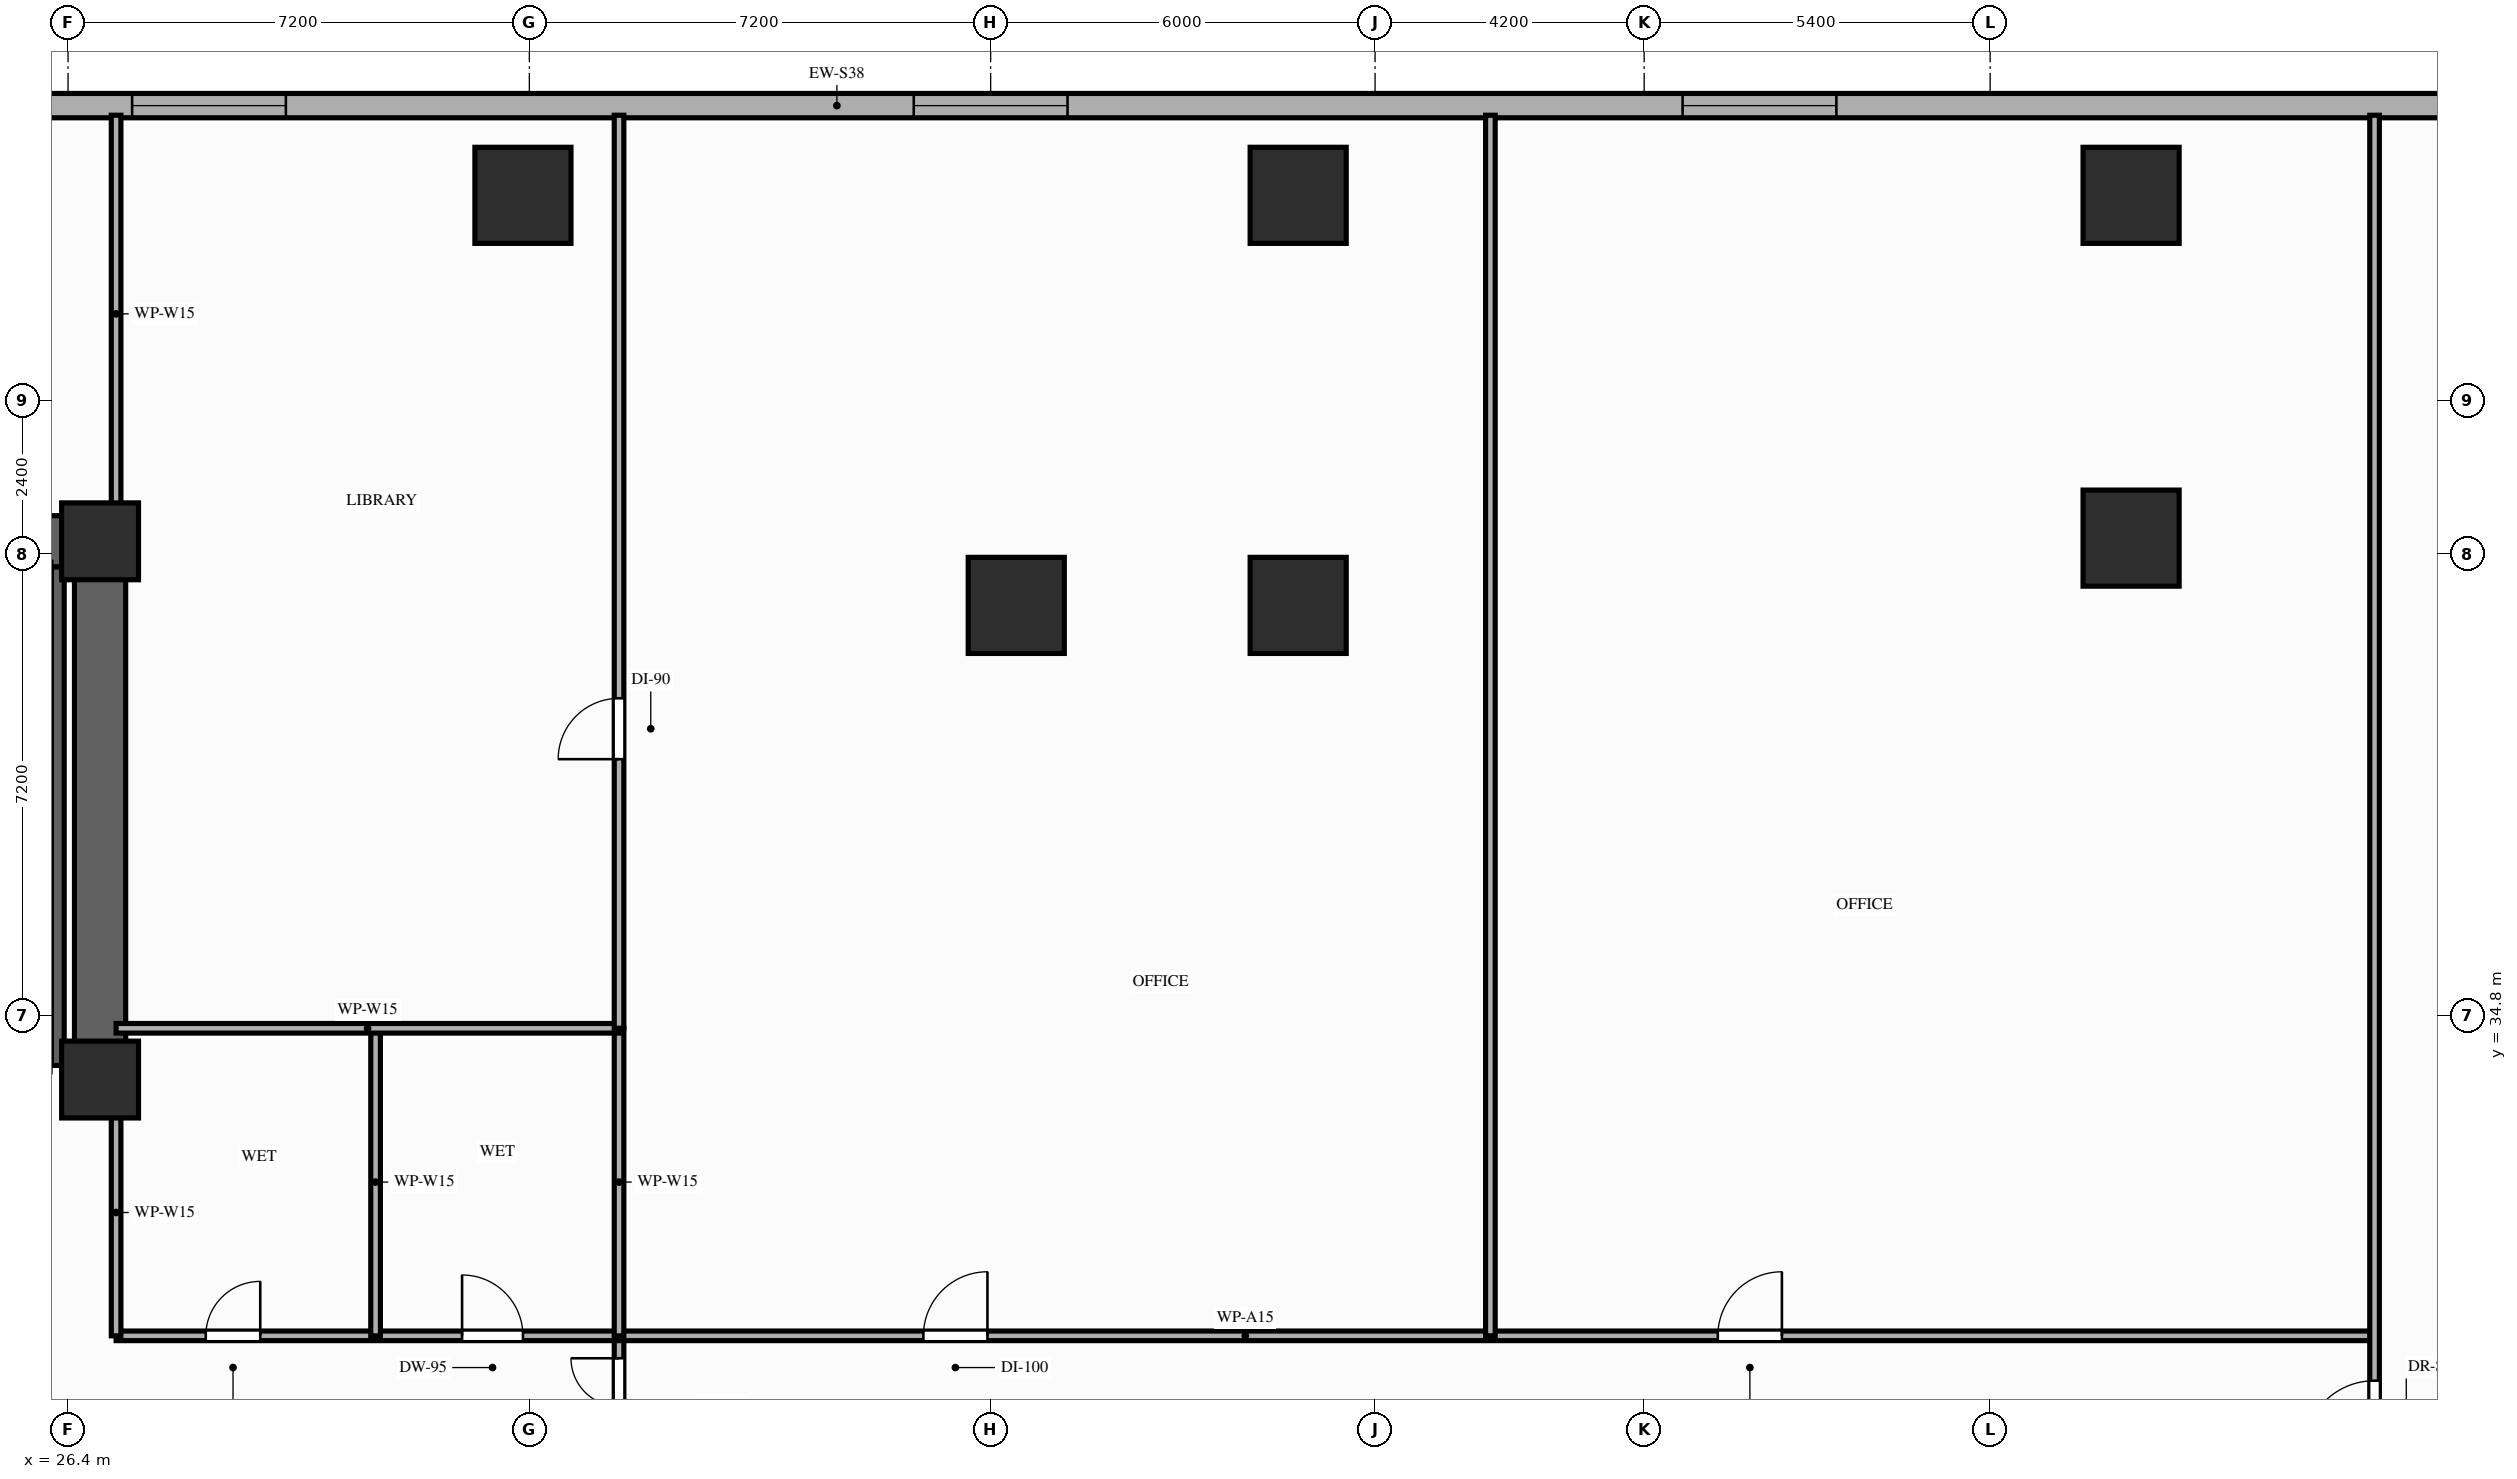
"""IFC4 building model, lengths in metres.
Left out: names, types, materials, properties, quantities, classifications, styles, units other than length and angle.
Written with IfcOpenShell. Run it as: python <this file> out.ifc"""

import sys

from ifc_helpers import new_model, si_unit, direction, frame, frame_2d, origin, origin_2d, place, context, subcontext, project, spatial, rectangle, extrude, element, fill, save


model = new_model("IFC4")
c1 = context("Model", 3, precision=1e-05, world=origin(), true_north=direction((0.0, 1.0)))
c2 = subcontext(c1, "Body", "Model", "MODEL_VIEW")
j1 = project(units=[si_unit("LENGTHUNIT", "METRE"), si_unit("PLANEANGLEUNIT", "RADIAN")], contexts=[c1])
p1 = place(None, origin())
s1 = spatial("IfcSite", under=j1, at=p1, CompositionType="ELEMENT")
p2 = place(p1, origin())
s2 = spatial("IfcBuilding", under=s1, at=p2, CompositionType="ELEMENT")
p3 = place(p2, frame((0.0, 0.0, 8.8)))
s3 = spatial("IfcBuildingStorey", under=s2, at=p3, CompositionType="ELEMENT", Elevation=8.8)
for number, where, z_axis, x_axis in (
    (1, (26.9, 33.8, 0.0), (0.0, 0.0, 1.0), (1.0, 0.0, 0.0)),
    (2, (26.9, 42.2, 0.0), (0.0, 0.0, 1.0), (1.0, 0.0, 0.0)),
):
    element("IfcColumn", number, at=place(p3, frame(where, z_axis=z_axis, x_axis=x_axis)), inside=s3, PredefinedType="COLUMN", context=c2, shape_type="SweptSolid", body=[
        extrude(rectangle(XDim=1.2, YDim=1.2, at=origin_2d()), origin(), (0.0, 0.0, 1.0), 4.2),
    ])
for number, where, z_axis, x_axis in (
    (3, (41.2, 41.2, 0.0), (0.0, 0.0, 1.0), (1.0, 0.0, 0.0)),
    (4, (45.6, 41.2, 0.0), (0.0, 0.0, 1.0), (1.0, 0.0, 0.0)),
    (5, (58.6, 42.25, 0.0), (0.0, 0.0, 1.0), (1.0, 0.0, 0.0)),
    (6, (33.5, 47.6, 0.0), (0.0, 0.0, 1.0), (1.0, 0.0, 0.0)),
    (7, (45.6, 47.6, 0.0), (0.0, 0.0, 1.0), (1.0, 0.0, 0.0)),
    (8, (58.6, 47.6, 0.0), (0.0, 0.0, 1.0), (1.0, 0.0, 0.0)),
):
    element("IfcColumn", number, at=place(p3, frame(where, z_axis=z_axis, x_axis=x_axis)), inside=s3, PredefinedType="COLUMN", context=c2, shape_type="SweptSolid", body=[
        extrude(rectangle(XDim=1.5, YDim=1.5, at=origin_2d()), origin(), (0.0, 0.0, 1.0), 4.2),
    ])
p4 = place(p3, frame((73.2, 49.0, 0.0), z_axis=(0.0, 0.0, 1.0), x_axis=(-1.0, 0.0, 0.0)))
e9 = element("IfcWall", 9, at=p4, inside=s3, PredefinedType="STANDARD", context=c2, shape_type="SweptSolid", body=[
    extrude(rectangle(XDim=69.6, YDim=0.38, at=frame_2d((34.8, 0.0))), origin(), (0.0, 0.0, 1.0), 3.95),
])
p5 = place(p4, frame((3.4, 0.0, 0.9)))
e10 = element("IfcOpeningElement", 10, at=p5, cuts=e9, PredefinedType="OPENING", context=c2, shape_type="SweptSolid", body=[
    extrude(rectangle(XDim=2.4, YDim=2.15, at=frame_2d((1.2, 1.075))), frame((0.0, 0.2, 0.0), z_axis=(0.0, -1.0, 0.0), x_axis=(1.0, 0.0, 0.0)), (0.0, 0.0, 1.0), 0.4),
])
p6 = place(p4, frame((19.2, 0.0, 0.9)))
e11 = element("IfcOpeningElement", 11, at=p6, cuts=e9, PredefinedType="OPENING", context=c2, shape_type="SweptSolid", body=[
    extrude(rectangle(XDim=2.4, YDim=2.15, at=frame_2d((1.2, 1.075))), frame((0.0, 0.2, 0.0), z_axis=(0.0, -1.0, 0.0), x_axis=(1.0, 0.0, 0.0)), (0.0, 0.0, 1.0), 0.4),
])
p7 = place(p4, frame((31.2, 0.0, 0.9)))
e12 = element("IfcOpeningElement", 12, at=p7, cuts=e9, PredefinedType="OPENING", context=c2, shape_type="SweptSolid", body=[
    extrude(rectangle(XDim=2.4, YDim=2.15, at=frame_2d((1.2, 1.075))), frame((0.0, 0.2, 0.0), z_axis=(0.0, -1.0, 0.0), x_axis=(1.0, 0.0, 0.0)), (0.0, 0.0, 1.0), 0.4),
])
p8 = place(p4, frame((43.4, 0.0, 0.9)))
e13 = element("IfcOpeningElement", 13, at=p8, cuts=e9, PredefinedType="OPENING", context=c2, shape_type="SweptSolid", body=[
    extrude(rectangle(XDim=2.4, YDim=2.15, at=frame_2d((1.2, 1.075))), frame((0.0, 0.2, 0.0), z_axis=(0.0, -1.0, 0.0), x_axis=(1.0, 0.0, 0.0)), (0.0, 0.0, 1.0), 0.4),
])
p9 = place(p4, frame((55.6, 0.0, 0.9)))
e14 = element("IfcOpeningElement", 14, at=p9, cuts=e9, PredefinedType="OPENING", context=c2, shape_type="SweptSolid", body=[
    extrude(rectangle(XDim=2.4, YDim=2.15, at=frame_2d((1.2, 1.075))), frame((0.0, 0.2, 0.0), z_axis=(0.0, -1.0, 0.0), x_axis=(1.0, 0.0, 0.0)), (0.0, 0.0, 1.0), 0.4),
])
p10 = place(p3, frame((6.45, 42.2, 0.0), z_axis=(0.0, 0.0, 1.0), x_axis=(1.0, 0.0, 0.0)))
e15 = element("IfcWall", 15, at=p10, inside=s3, PredefinedType="SHEAR", context=c2, shape_type="SweptSolid", body=[
    extrude(rectangle(XDim=20.45, YDim=0.8, at=frame_2d((10.225, 0.0))), origin(), (0.0, 0.0, 1.0), 3.95),
])
p11 = place(p3, frame((26.9, 33.8, 0.0), z_axis=(0.0, 0.0, 1.0), x_axis=(0.0, 1.0, 0.0)))
e16 = element("IfcWall", 16, at=p11, inside=s3, PredefinedType="SHEAR", context=c2, shape_type="SweptSolid", body=[
    extrude(rectangle(XDim=7.95, YDim=0.8, at=frame_2d((3.975, 0.0))), origin(), (0.0, 0.0, 1.0), 3.95),
])
p12 = place(p3, frame((26.24, 34.02, 0.0), z_axis=(0.0, 0.0, 1.0), x_axis=(0.0, 1.0, 0.0)))
e17 = element("IfcWall", 17, at=p12, inside=s3, PredefinedType="SHEAR", context=c2, shape_type="SweptSolid", body=[
    extrude(rectangle(XDim=7.78, YDim=0.2, at=frame_2d((3.89, 0.0))), origin(), (0.0, 0.0, 1.0), 3.95),
])
p13 = place(p3, frame((35.0, 27.6, 0.0), z_axis=(0.0, 0.0, 1.0), x_axis=(0.0, 1.0, 0.0)))
e18 = element("IfcWall", 18, at=p13, inside=s3, PredefinedType="PARTITIONING", context=c2, shape_type="SweptSolid", body=[
    extrude(rectangle(XDim=2.2, YDim=0.15, at=frame_2d((1.1, 0.0))), origin(), (0.0, 0.0, 1.0), 3.13),
])
p14 = place(p13, frame((0.35, 0.0, 0.0)))
e19 = element("IfcOpeningElement", 19, at=p14, cuts=e18, PredefinedType="OPENING", context=c2, shape_type="SweptSolid", body=[
    extrude(rectangle(XDim=1.5, YDim=2.18, at=frame_2d((0.75, 1.09))), frame((0.0, 0.085, 0.0), z_axis=(0.0, -1.0, 0.0), x_axis=(1.0, 0.0, 0.0)), (0.0, 0.0, 1.0), 0.17),
])
p15 = place(p3, frame((27.15, 29.8, 0.0), z_axis=(0.0, 0.0, 1.0), x_axis=(1.0, 0.0, 0.0)))
e20 = element("IfcWall", 20, at=p15, inside=s3, PredefinedType="PARTITIONING", context=c2, shape_type="SweptSolid", body=[
    extrude(rectangle(XDim=35.25, YDim=0.15, at=frame_2d((17.625, 0.0))), origin(), (0.0, 0.0, 1.0), 3.13),
])
p16 = place(p15, frame((25.0, 0.0, 0.0)))
e21 = element("IfcOpeningElement", 21, at=p16, cuts=e20, PredefinedType="OPENING", context=c2, shape_type="SweptSolid", body=[
    extrude(rectangle(XDim=1.0, YDim=2.15, at=frame_2d((0.5, 1.075))), frame((0.0, 0.085, 0.0), z_axis=(0.0, -1.0, 0.0), x_axis=(1.0, 0.0, 0.0)), (0.0, 0.0, 1.0), 0.17),
])
p17 = place(p15, frame((1.4, 0.0, 0.0)))
e22 = element("IfcOpeningElement", 22, at=p17, cuts=e20, PredefinedType="OPENING", context=c2, shape_type="SweptSolid", body=[
    extrude(rectangle(XDim=0.85, YDim=2.1, at=frame_2d((0.425, 1.05))), frame((0.0, 0.085, 0.0), z_axis=(0.0, -1.0, 0.0), x_axis=(1.0, 0.0, 0.0)), (0.0, 0.0, 1.0), 0.17),
])
p18 = place(p15, frame((5.4, 0.0, 0.0)))
e23 = element("IfcOpeningElement", 23, at=p18, cuts=e20, PredefinedType="OPENING", context=c2, shape_type="SweptSolid", body=[
    extrude(rectangle(XDim=0.95, YDim=2.1, at=frame_2d((0.475, 1.05))), frame((0.0, 0.085, 0.0), z_axis=(0.0, -1.0, 0.0), x_axis=(1.0, 0.0, 0.0)), (0.0, 0.0, 1.0), 0.17),
])
p19 = place(p15, frame((12.6, 0.0, 0.0)))
e24 = element("IfcOpeningElement", 24, at=p19, cuts=e20, PredefinedType="OPENING", context=c2, shape_type="SweptSolid", body=[
    extrude(rectangle(XDim=1.0, YDim=2.15, at=frame_2d((0.5, 1.075))), frame((0.0, 0.085, 0.0), z_axis=(0.0, -1.0, 0.0), x_axis=(1.0, 0.0, 0.0)), (0.0, 0.0, 1.0), 0.17),
])
p20 = place(p3, frame((27.15, 29.8, 0.0), z_axis=(0.0, 0.0, 1.0), x_axis=(0.0, 1.0, 0.0)))
e25 = element("IfcWall", 25, at=p20, inside=s3, PredefinedType="PARTITIONING", context=c2, shape_type="SweptSolid", body=[
    extrude(rectangle(XDim=3.85, YDim=0.15, at=frame_2d((1.925, 0.0))), origin(), (0.0, 0.0, 1.0), 3.13),
])
p21 = place(p3, frame((27.15, 42.65, 0.0), z_axis=(0.0, 0.0, 1.0), x_axis=(0.0, 1.0, 0.0)))
e26 = element("IfcWall", 26, at=p21, inside=s3, PredefinedType="PARTITIONING", context=c2, shape_type="SweptSolid", body=[
    extrude(rectangle(XDim=6.2, YDim=0.15, at=frame_2d((3.1, 0.0))), origin(), (0.0, 0.0, 1.0), 3.95),
])
for number, where, z_axis, x_axis in (
    (27, (31.2, 29.8, 0.0), (0.0, 0.0, 1.0), (0.0, 1.0, 0.0)),
    (28, (35.0, 29.8, 0.0), (0.0, 0.0, 1.0), (0.0, 1.0, 0.0)),
):
    element("IfcWall", number, at=place(p3, frame(where, z_axis=z_axis, x_axis=x_axis)), inside=s3, PredefinedType="PARTITIONING", context=c2, shape_type="SweptSolid", body=[
        extrude(rectangle(XDim=4.8, YDim=0.15, at=frame_2d((2.4, 0.0))), origin(), (0.0, 0.0, 1.0), 3.95),
    ])
p22 = place(p3, frame((27.15, 34.6, 0.0), z_axis=(0.0, 0.0, 1.0), x_axis=(1.0, 0.0, 0.0)))
e29 = element("IfcWall", 29, at=p22, inside=s3, PredefinedType="PARTITIONING", context=c2, shape_type="SweptSolid", body=[
    extrude(rectangle(XDim=7.85, YDim=0.15, at=frame_2d((3.925, 0.0))), origin(), (0.0, 0.0, 1.0), 3.13),
])
p23 = place(p3, frame((35.0, 34.6, 0.0), z_axis=(0.0, 0.0, 1.0), x_axis=(0.0, 1.0, 0.0)))
e30 = element("IfcWall", 30, at=p23, inside=s3, PredefinedType="PARTITIONING", context=c2, shape_type="SweptSolid", body=[
    extrude(rectangle(XDim=14.25, YDim=0.15, at=frame_2d((7.125, 0.0))), origin(), (0.0, 0.0, 1.0), 3.13),
])
p24 = place(p23, frame((4.2, 0.0, 0.0)))
e31 = element("IfcOpeningElement", 31, at=p24, cuts=e30, PredefinedType="OPENING", context=c2, shape_type="SweptSolid", body=[
    extrude(rectangle(XDim=0.95, YDim=2.15, at=frame_2d((0.475, 1.075))), frame((0.0, 0.085, 0.0), z_axis=(0.0, -1.0, 0.0), x_axis=(1.0, 0.0, 0.0)), (0.0, 0.0, 1.0), 0.17),
])
p25 = place(p3, frame((48.6, 29.8, 0.0), z_axis=(0.0, 0.0, 1.0), x_axis=(0.0, 1.0, 0.0)))
e32 = element("IfcWall", 32, at=p25, inside=s3, PredefinedType="PARTITIONING", context=c2, shape_type="SweptSolid", body=[
    extrude(rectangle(XDim=19.05, YDim=0.15, at=frame_2d((9.525, 0.0))), origin(), (0.0, 0.0, 1.0), 3.13),
])
p26 = place(p3, frame((62.4, 21.8, 0.0), z_axis=(0.0, 0.0, 1.0), x_axis=(0.0, 1.0, 0.0)))
e33 = element("IfcWall", 33, at=p26, inside=s3, PredefinedType="PARTITIONING", context=c2, shape_type="SweptSolid", body=[
    extrude(rectangle(XDim=27.05, YDim=0.15, at=frame_2d((13.525, 0.0))), origin(), (0.0, 0.0, 1.0), 3.13),
])
p27 = place(p26, frame((6.2, 0.0, 0.0)))
e34 = element("IfcOpeningElement", 34, at=p27, cuts=e33, PredefinedType="OPENING", context=c2, shape_type="SweptSolid", body=[
    extrude(rectangle(XDim=1.1, YDim=2.15, at=frame_2d((0.55, 1.075))), frame((0.0, 0.085, 0.0), z_axis=(0.0, -1.0, 0.0), x_axis=(1.0, 0.0, 0.0)), (0.0, 0.0, 1.0), 0.17),
])
p28 = place(p6, origin())
e35 = element("IfcWindow", 35, at=p28, inside=s3, PartitioningType="SINGLE_PANEL", PredefinedType="WINDOW", context=c2, shape_type="SweptSolid", body=[
    extrude(rectangle(XDim=2.4, YDim=2.15, at=frame_2d((1.2, 1.075))), frame((0.0, 0.03, 0.0), z_axis=(0.0, -1.0, 0.0), x_axis=(1.0, 0.0, 0.0)), (0.0, 0.0, 1.0), 0.06),
])
fill(e11, e35)
p29 = place(p7, origin())
e36 = element("IfcWindow", 36, at=p29, inside=s3, PartitioningType="SINGLE_PANEL", PredefinedType="WINDOW", context=c2, shape_type="SweptSolid", body=[
    extrude(rectangle(XDim=2.4, YDim=2.15, at=frame_2d((1.2, 1.075))), frame((0.0, 0.03, 0.0), z_axis=(0.0, -1.0, 0.0), x_axis=(1.0, 0.0, 0.0)), (0.0, 0.0, 1.0), 0.06),
])
fill(e12, e36)
p30 = place(p8, origin())
e37 = element("IfcWindow", 37, at=p30, inside=s3, PartitioningType="SINGLE_PANEL", PredefinedType="WINDOW", context=c2, shape_type="SweptSolid", body=[
    extrude(rectangle(XDim=2.4, YDim=2.15, at=frame_2d((1.2, 1.075))), frame((0.0, 0.03, 0.0), z_axis=(0.0, -1.0, 0.0), x_axis=(1.0, 0.0, 0.0)), (0.0, 0.0, 1.0), 0.06),
])
fill(e13, e37)
p31 = place(p16, origin())
e38 = element("IfcDoor", 38, at=p31, inside=s3, OperationType="SINGLE_SWING_RIGHT", PredefinedType="DOOR", context=c2, shape_type="SweptSolid", body=[
    extrude(rectangle(XDim=1.0, YDim=2.15, at=frame_2d((0.5, 1.075))), frame((0.0, 0.025, 0.0), z_axis=(0.0, -1.0, 0.0), x_axis=(1.0, 0.0, 0.0)), (0.0, 0.0, 1.0), 0.05),
])
fill(e21, e38)
p32 = place(p14, origin())
e39 = element("IfcDoor", 39, at=p32, inside=s3, OperationType="DOUBLE_DOOR_SINGLE_SWING", PredefinedType="DOOR", context=c2, shape_type="SweptSolid", body=[
    extrude(rectangle(XDim=1.5, YDim=2.18, at=frame_2d((0.75, 1.09))), frame((0.0, 0.025, 0.0), z_axis=(0.0, -1.0, 0.0), x_axis=(1.0, 0.0, 0.0)), (0.0, 0.0, 1.0), 0.05),
])
fill(e19, e39)
p33 = place(p27, origin())
e40 = element("IfcDoor", 40, at=p33, inside=s3, OperationType="SINGLE_SWING_LEFT", PredefinedType="DOOR", context=c2, shape_type="SweptSolid", body=[
    extrude(rectangle(XDim=1.1, YDim=2.15, at=frame_2d((0.55, 1.075))), frame((0.0, 0.025, 0.0), z_axis=(0.0, -1.0, 0.0), x_axis=(1.0, 0.0, 0.0)), (0.0, 0.0, 1.0), 0.05),
])
fill(e34, e40)
p34 = place(p17, origin())
e41 = element("IfcDoor", 41, at=p34, inside=s3, OperationType="SINGLE_SWING_RIGHT", PredefinedType="DOOR", context=c2, shape_type="SweptSolid", body=[
    extrude(rectangle(XDim=0.85, YDim=2.1, at=frame_2d((0.425, 1.05))), frame((0.0, 0.025, 0.0), z_axis=(0.0, -1.0, 0.0), x_axis=(1.0, 0.0, 0.0)), (0.0, 0.0, 1.0), 0.05),
])
fill(e22, e41)
p35 = place(p18, origin())
e42 = element("IfcDoor", 42, at=p35, inside=s3, OperationType="SINGLE_SWING_LEFT", PredefinedType="DOOR", context=c2, shape_type="SweptSolid", body=[
    extrude(rectangle(XDim=0.95, YDim=2.1, at=frame_2d((0.475, 1.05))), frame((0.0, 0.025, 0.0), z_axis=(0.0, -1.0, 0.0), x_axis=(1.0, 0.0, 0.0)), (0.0, 0.0, 1.0), 0.05),
])
fill(e23, e42)
p36 = place(p19, origin())
e43 = element("IfcDoor", 43, at=p36, inside=s3, OperationType="SINGLE_SWING_RIGHT", PredefinedType="DOOR", context=c2, shape_type="SweptSolid", body=[
    extrude(rectangle(XDim=1.0, YDim=2.15, at=frame_2d((0.5, 1.075))), frame((0.0, 0.025, 0.0), z_axis=(0.0, -1.0, 0.0), x_axis=(1.0, 0.0, 0.0)), (0.0, 0.0, 1.0), 0.05),
])
fill(e24, e43)
p37 = place(p24, origin())
e44 = element("IfcDoor", 44, at=p37, inside=s3, OperationType="SINGLE_SWING_LEFT", PredefinedType="DOOR", context=c2, shape_type="SweptSolid", body=[
    extrude(rectangle(XDim=0.95, YDim=2.15, at=frame_2d((0.475, 1.075))), frame((0.0, 0.025, 0.0), z_axis=(0.0, -1.0, 0.0), x_axis=(1.0, 0.0, 0.0)), (0.0, 0.0, 1.0), 0.05),
])
fill(e31, e44)
save(model, sys.argv[1])
